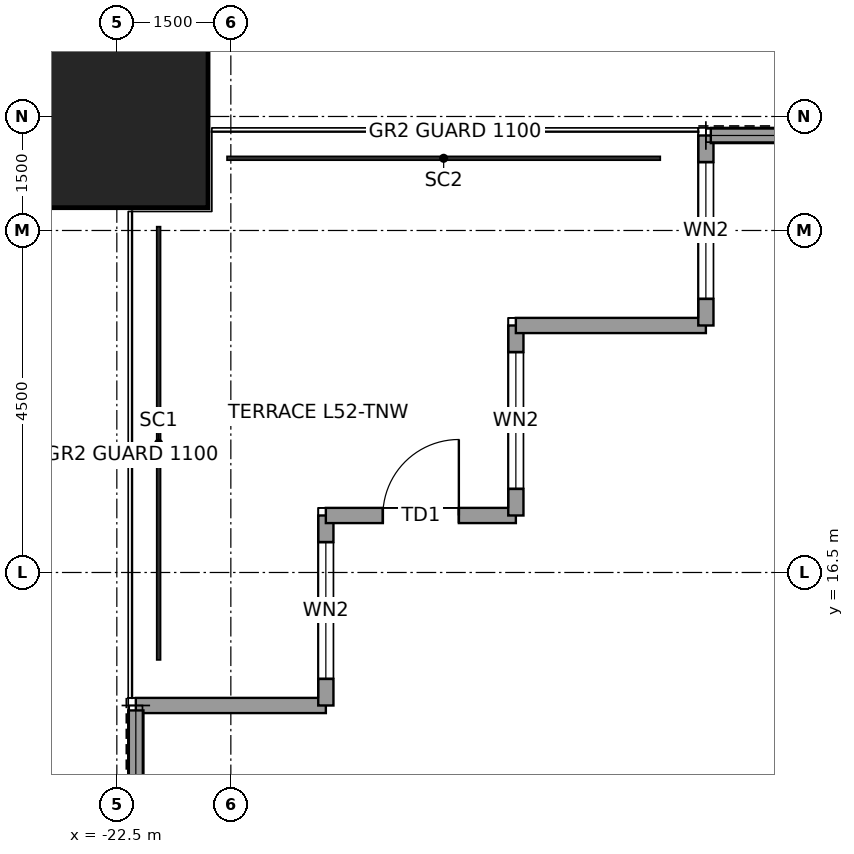
"""IFC4 building model, lengths in metres.
Left out: names, types, materials, properties, quantities, classifications, styles, units other than length and angle.
Written with IfcOpenShell. Run it as: python <this file> out.ifc"""

import sys

from ifc_helpers import new_model, si_unit, direction, frame, frame_2d, origin, origin_2d, place, context, subcontext, project, spatial, rectangle, hollow_rectangle, extrude, element, fill, save


model = new_model("IFC4")
c1 = context("Model", 3, precision=1e-05, world=origin(), true_north=direction((0.0, 1.0)))
c2 = subcontext(c1, "Body", "Model", "MODEL_VIEW")
j1 = project(units=[si_unit("LENGTHUNIT", "METRE"), si_unit("PLANEANGLEUNIT", "RADIAN")], contexts=[c1])
p1 = place(None, origin())
s1 = spatial("IfcSite", under=j1, at=p1, CompositionType="ELEMENT")
p2 = place(p1, origin())
s2 = spatial("IfcBuilding", under=s1, at=p2, CompositionType="ELEMENT")
p3 = place(p2, frame((0.0, 0.0, 241.9)))
s3 = spatial("IfcBuildingStorey", under=s2, at=p3, CompositionType="ELEMENT", Elevation=241.9)
p4 = place(p3, frame((-22.5, 22.5, 0.0), z_axis=(0.0, 0.0, 1.0), x_axis=(1.0, 0.0, 0.0)))
e1 = element("IfcColumn", 1, at=p4, inside=s3, PredefinedType="COLUMN", context=c2, shape_type="SweptSolid", body=[
    extrude(hollow_rectangle(XDim=2.4, YDim=2.4, WallThickness=0.12, at=origin_2d()), origin(), (0.0, 0.0, 1.0), 4.0),
])
p5 = place(p3, frame((-22.25, 14.75, 0.0), z_axis=(0.0, 0.0, 1.0), x_axis=(1.0, 0.0, 0.0)))
e2 = element("IfcWall", 2, at=p5, inside=s3, PredefinedType="SOLIDWALL", context=c2, shape_type="SweptSolid", body=[
    extrude(rectangle(XDim=2.5, YDim=0.2, at=frame_2d((1.25, 0.0))), origin(), (0.0, 0.0, 1.0), 3.85),
])
p6 = place(p3, frame((-19.75, 14.75, 0.0), z_axis=(0.0, 0.0, 1.0), x_axis=(0.0, 1.0, 0.0)))
e3 = element("IfcWall", 3, at=p6, inside=s3, PredefinedType="SOLIDWALL", context=c2, shape_type="SweptSolid", body=[
    extrude(rectangle(XDim=2.5, YDim=0.2, at=frame_2d((1.25, 0.0))), origin(), (0.0, 0.0, 1.0), 3.85),
])
p7 = place(p6, frame((0.35, 0.0, 0.3)))
e4 = element("IfcOpeningElement", 4, at=p7, cuts=e3, PredefinedType="OPENING", context=c2, shape_type="SweptSolid", body=[
    extrude(rectangle(XDim=1.8, YDim=2.4, at=frame_2d((0.9, 1.2))), frame((0.0, 0.11, 0.0), z_axis=(0.0, -1.0, 0.0), x_axis=(1.0, 0.0, 0.0)), (0.0, 0.0, 1.0), 0.22),
])
p8 = place(p3, frame((-19.75, 17.25, 0.0), z_axis=(0.0, 0.0, 1.0), x_axis=(1.0, 0.0, 0.0)))
e5 = element("IfcWall", 5, at=p8, inside=s3, PredefinedType="SOLIDWALL", context=c2, shape_type="SweptSolid", body=[
    extrude(rectangle(XDim=2.5, YDim=0.2, at=frame_2d((1.25, 0.0))), origin(), (0.0, 0.0, 1.0), 3.85),
])
p9 = place(p8, frame((0.75, 0.0, 0.0)))
e6 = element("IfcOpeningElement", 6, at=p9, cuts=e5, PredefinedType="OPENING", context=c2, shape_type="SweptSolid", body=[
    extrude(rectangle(XDim=1.0, YDim=2.4, at=frame_2d((0.5, 1.2))), frame((0.0, 0.11, 0.0), z_axis=(0.0, -1.0, 0.0), x_axis=(1.0, 0.0, 0.0)), (0.0, 0.0, 1.0), 0.22),
])
p10 = place(p3, frame((-17.25, 17.25, 0.0), z_axis=(0.0, 0.0, 1.0), x_axis=(0.0, 1.0, 0.0)))
e7 = element("IfcWall", 7, at=p10, inside=s3, PredefinedType="SOLIDWALL", context=c2, shape_type="SweptSolid", body=[
    extrude(rectangle(XDim=2.5, YDim=0.2, at=frame_2d((1.25, 0.0))), origin(), (0.0, 0.0, 1.0), 3.85),
])
p11 = place(p10, frame((0.35, 0.0, 0.3)))
e8 = element("IfcOpeningElement", 8, at=p11, cuts=e7, PredefinedType="OPENING", context=c2, shape_type="SweptSolid", body=[
    extrude(rectangle(XDim=1.8, YDim=2.4, at=frame_2d((0.9, 1.2))), frame((0.0, 0.11, 0.0), z_axis=(0.0, -1.0, 0.0), x_axis=(1.0, 0.0, 0.0)), (0.0, 0.0, 1.0), 0.22),
])
p12 = place(p3, frame((-17.25, 19.75, 0.0), z_axis=(0.0, 0.0, 1.0), x_axis=(1.0, 0.0, 0.0)))
e9 = element("IfcWall", 9, at=p12, inside=s3, PredefinedType="SOLIDWALL", context=c2, shape_type="SweptSolid", body=[
    extrude(rectangle(XDim=2.5, YDim=0.2, at=frame_2d((1.25, 0.0))), origin(), (0.0, 0.0, 1.0), 3.85),
])
p13 = place(p3, frame((-14.75, 19.75, 0.0), z_axis=(0.0, 0.0, 1.0), x_axis=(0.0, 1.0, 0.0)))
e10 = element("IfcWall", 10, at=p13, inside=s3, PredefinedType="SOLIDWALL", context=c2, shape_type="SweptSolid", body=[
    extrude(rectangle(XDim=2.5, YDim=0.2, at=frame_2d((1.25, 0.0))), origin(), (0.0, 0.0, 1.0), 3.85),
])
p14 = place(p13, frame((0.35, 0.0, 0.3)))
e11 = element("IfcOpeningElement", 11, at=p14, cuts=e10, PredefinedType="OPENING", context=c2, shape_type="SweptSolid", body=[
    extrude(rectangle(XDim=1.8, YDim=2.4, at=frame_2d((0.9, 1.2))), frame((0.0, 0.11, 0.0), z_axis=(0.0, -1.0, 0.0), x_axis=(1.0, 0.0, 0.0)), (0.0, 0.0, 1.0), 0.22),
])
for number, where, z_axis, x_axis in (
    (12, (-14.685, 22.25, 0.0), (0.0, 0.0, 1.0), (1.0, 0.0, 0.0)),
    (13, (-22.25, 12.366, 0.0), (0.0, 0.0, 1.0), (0.0, 1.0, 0.0)),
):
    element("IfcWall", number, at=place(p3, frame(where, z_axis=z_axis, x_axis=x_axis)), inside=s3, PredefinedType="SOLIDWALL", context=c2, shape_type="SweptSolid", body=[
        extrude(rectangle(XDim=2.319, YDim=0.2, at=frame_2d((1.16, 0.0))), origin(), (0.0, 0.0, 1.0), 3.85),
    ])
p15 = place(p7, origin())
e14 = element("IfcWindow", 14, at=p15, inside=s3, PartitioningType="SINGLE_PANEL", PredefinedType="WINDOW", context=c2, shape_type="SweptSolid", body=[
    extrude(rectangle(XDim=1.8, YDim=2.4, at=frame_2d((0.9, 1.2))), frame((0.0, 0.03, 0.0), z_axis=(0.0, -1.0, 0.0), x_axis=(1.0, 0.0, 0.0)), (0.0, 0.0, 1.0), 0.06),
])
fill(e4, e14)
p16 = place(p9, origin())
e15 = element("IfcDoor", 15, at=p16, inside=s3, OperationType="SINGLE_SWING_RIGHT", PredefinedType="DOOR", context=c2, shape_type="SweptSolid", body=[
    extrude(rectangle(XDim=1.0, YDim=2.4, at=frame_2d((0.5, 1.2))), frame((0.0, 0.025, 0.0), z_axis=(0.0, -1.0, 0.0), x_axis=(1.0, 0.0, 0.0)), (0.0, 0.0, 1.0), 0.05),
])
fill(e6, e15)
p17 = place(p11, origin())
e16 = element("IfcWindow", 16, at=p17, inside=s3, PartitioningType="SINGLE_PANEL", PredefinedType="WINDOW", context=c2, shape_type="SweptSolid", body=[
    extrude(rectangle(XDim=1.8, YDim=2.4, at=frame_2d((0.9, 1.2))), frame((0.0, 0.03, 0.0), z_axis=(0.0, -1.0, 0.0), x_axis=(1.0, 0.0, 0.0)), (0.0, 0.0, 1.0), 0.06),
])
fill(e8, e16)
p18 = place(p14, origin())
e17 = element("IfcWindow", 17, at=p18, inside=s3, PartitioningType="SINGLE_PANEL", PredefinedType="WINDOW", context=c2, shape_type="SweptSolid", body=[
    extrude(rectangle(XDim=1.8, YDim=2.4, at=frame_2d((0.9, 1.2))), frame((0.0, 0.03, 0.0), z_axis=(0.0, -1.0, 0.0), x_axis=(1.0, 0.0, 0.0)), (0.0, 0.0, 1.0), 0.06),
])
fill(e11, e17)
save(model, sys.argv[1])
